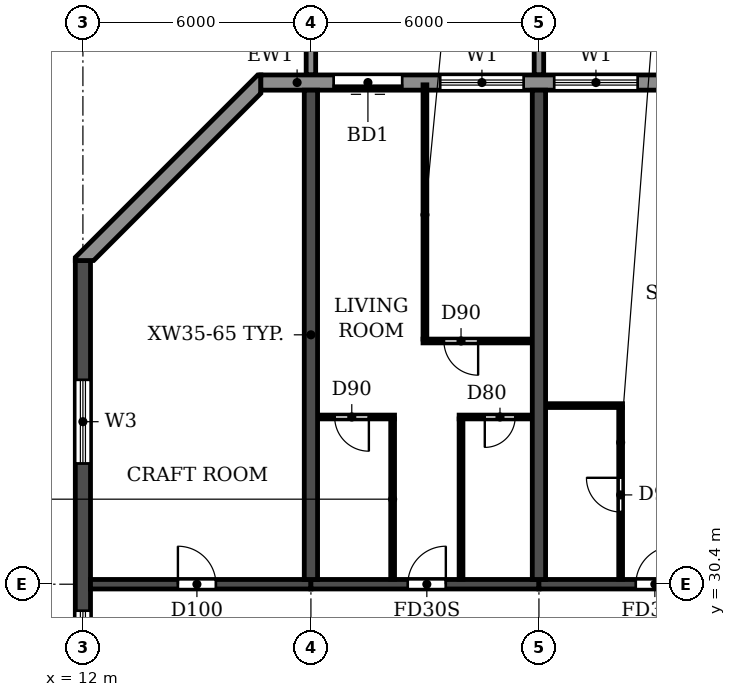
"""IFC4 building model, lengths in metres.
Left out: names, types, materials, properties, quantities, classifications, styles, units other than length and angle.
Written with IfcOpenShell. Run it as: python <this file> out.ifc"""

import sys

from ifc_helpers import new_model, si_unit, direction, frame, frame_2d, origin, place, context, subcontext, project, spatial, polyline, rectangle, outline, extrude, source, transform, mapped, element, fill, save


model = new_model("IFC4")
c1 = context("Model", 3, precision=1e-05, world=origin(), true_north=direction((0.0, 1.0)))
c2 = subcontext(c1, "Body", "Model", "MODEL_VIEW")
j1 = project(units=[si_unit("LENGTHUNIT", "METRE"), si_unit("PLANEANGLEUNIT", "RADIAN")], contexts=[c1])
p1 = place(None, origin())
s1 = spatial("IfcSite", under=j1, at=p1, CompositionType="ELEMENT")
p2 = place(p1, origin())
s2 = spatial("IfcBuilding", under=s1, at=p2, CompositionType="ELEMENT")
p3 = place(p2, frame((0.0, 0.0, 112.5)))
s3 = spatial("IfcBuildingStorey", under=s2, at=p3, CompositionType="ELEMENT", Elevation=112.5)
for number, where, z_axis, x_axis in (
    (1, (18.0, 30.525, 0.0), (0.0, 0.0, 1.0), (0.0, 1.0, 0.0)),
    (2, (24.0, 30.525, 0.0), (0.0, 0.0, 1.0), (0.0, 1.0, 0.0)),
):
    element("IfcWall", number, at=place(p3, frame(where, z_axis=z_axis, x_axis=x_axis)), inside=s3, PredefinedType="SHEAR", context=c2, shape_type="SweptSolid", body=[
        extrude(rectangle(XDim=12.875, YDim=0.35, at=frame_2d((6.438, 0.0))), origin(), (0.0, 0.0, 1.0), 2.95),
    ])
p4 = place(p3, frame((12.0, 4.683, 0.0), z_axis=(0.0, 0.0, 1.0), x_axis=(0.0, 1.0, 0.0)))
e3 = element("IfcWall", 3, at=p4, inside=s3, PredefinedType="SHEAR", context=c2, shape_type="SweptSolid", body=[
    extrude(rectangle(XDim=34.234, YDim=0.4, at=frame_2d((17.117, 0.0))), origin(), (0.0, 0.0, 1.0), 2.95),
])
p5 = place(p4, frame((23.817, 0.0, 0.9)))
e4 = element("IfcOpeningElement", 4, at=p5, cuts=e3, PredefinedType="OPENING", context=c2, shape_type="SweptSolid", body=[
    extrude(rectangle(XDim=1.2, YDim=1.5, at=frame_2d((0.6, 0.75))), frame((0.0, 0.21, 0.0), z_axis=(0.0, -1.0, 0.0), x_axis=(1.0, 0.0, 0.0)), (0.0, 0.0, 1.0), 0.42),
])
p6 = place(p4, frame((8.017, 0.0, 0.9)))
e5 = element("IfcOpeningElement", 5, at=p6, cuts=e3, PredefinedType="OPENING", context=c2, shape_type="SweptSolid", body=[
    extrude(rectangle(XDim=1.2, YDim=1.5, at=frame_2d((0.6, 0.75))), frame((0.0, 0.21, 0.0), z_axis=(0.0, -1.0, 0.0), x_axis=(1.0, 0.0, 0.0)), (0.0, 0.0, 1.0), 0.42),
])
p7 = place(p4, frame((15.917, 0.0, 0.9)))
e6 = element("IfcOpeningElement", 6, at=p7, cuts=e3, PredefinedType="OPENING", context=c2, shape_type="SweptSolid", body=[
    extrude(rectangle(XDim=1.2, YDim=1.5, at=frame_2d((0.6, 0.75))), frame((0.0, 0.21, 0.0), z_axis=(0.0, -1.0, 0.0), x_axis=(1.0, 0.0, 0.0)), (0.0, 0.0, 1.0), 0.42),
])
p8 = place(p4, frame((28.894, 0.0, 0.6)))
e7 = element("IfcOpeningElement", 7, at=p8, cuts=e3, PredefinedType="OPENING", context=c2, shape_type="SweptSolid", body=[
    extrude(rectangle(XDim=2.2, YDim=1.8, at=frame_2d((1.1, 0.9))), frame((0.0, 0.21, 0.0), z_axis=(0.0, -1.0, 0.0), x_axis=(1.0, 0.0, 0.0)), (0.0, 0.0, 1.0), 0.42),
])
p9 = place(p4, frame((2.541, 0.0, 0.6)))
e8 = element("IfcOpeningElement", 8, at=p9, cuts=e3, PredefinedType="OPENING", context=c2, shape_type="SweptSolid", body=[
    extrude(rectangle(XDim=2.2, YDim=1.8, at=frame_2d((1.1, 0.9))), frame((0.0, 0.21, 0.0), z_axis=(0.0, -1.0, 0.0), x_axis=(1.0, 0.0, 0.0)), (0.0, 0.0, 1.0), 0.42),
])
p10 = place(p3, frame((12.2, 30.4, 0.0), z_axis=(0.0, 0.0, 1.0), x_axis=(1.0, 0.0, 0.0)))
e9 = element("IfcWall", 9, at=p10, inside=s3, PredefinedType="SHEAR", context=c2, shape_type="SweptSolid", body=[
    extrude(rectangle(XDim=5.8, YDim=0.25, at=frame_2d((2.9, 0.0))), origin(), (0.0, 0.0, 1.0), 2.35),
])
p11 = place(p10, frame((2.3, 0.0, 0.0)))
e10 = element("IfcOpeningElement", 10, at=p11, cuts=e9, PredefinedType="OPENING", context=c2, shape_type="SweptSolid", body=[
    extrude(rectangle(XDim=1.0, YDim=2.1, at=frame_2d((0.5, 1.05))), frame((0.0, 0.135, 0.0), z_axis=(0.0, -1.0, 0.0), x_axis=(1.0, 0.0, 0.0)), (0.0, 0.0, 1.0), 0.27),
])
p12 = place(p3, frame((18.0, 30.4, 0.0), z_axis=(0.0, 0.0, 1.0), x_axis=(1.0, 0.0, 0.0)))
e11 = element("IfcWall", 11, at=p12, inside=s3, PredefinedType="SHEAR", context=c2, shape_type="SweptSolid", body=[
    extrude(rectangle(XDim=6.0, YDim=0.25, at=frame_2d((3.0, 0.0))), origin(), (0.0, 0.0, 1.0), 2.35),
])
p13 = place(p12, frame((2.55, 0.0, 0.0)))
e12 = element("IfcOpeningElement", 12, at=p13, cuts=e11, PredefinedType="OPENING", context=c2, shape_type="SweptSolid", body=[
    extrude(rectangle(XDim=1.0, YDim=2.1, at=frame_2d((0.5, 1.05))), frame((0.0, 0.135, 0.0), z_axis=(0.0, -1.0, 0.0), x_axis=(1.0, 0.0, 0.0)), (0.0, 0.0, 1.0), 0.27),
])
p14 = place(p3, frame((24.0, 30.4, 0.0), z_axis=(0.0, 0.0, 1.0), x_axis=(1.0, 0.0, 0.0)))
e13 = element("IfcWall", 13, at=p14, inside=s3, PredefinedType="SHEAR", context=c2, shape_type="SweptSolid", body=[
    extrude(rectangle(XDim=6.0, YDim=0.25, at=frame_2d((3.0, 0.0))), origin(), (0.0, 0.0, 1.0), 2.35),
])
p15 = place(p14, frame((2.55, 0.0, 0.0)))
e14 = element("IfcOpeningElement", 14, at=p15, cuts=e13, PredefinedType="OPENING", context=c2, shape_type="SweptSolid", body=[
    extrude(rectangle(XDim=1.0, YDim=2.1, at=frame_2d((0.5, 1.05))), frame((0.0, 0.135, 0.0), z_axis=(0.0, -1.0, 0.0), x_axis=(1.0, 0.0, 0.0)), (0.0, 0.0, 1.0), 0.27),
])
p16 = place(p3, frame((85.317, 43.6, 0.0), z_axis=(0.0, 0.0, 1.0), x_axis=(-1.0, 0.0, 0.0)))
e15 = element("IfcWall", 15, at=p16, inside=s3, PredefinedType="STANDARD", context=c2, shape_type="SweptSolid", body=[
    extrude(rectangle(XDim=68.634, YDim=0.4, at=frame_2d((34.317, 0.0))), origin(), (0.0, 0.0, 1.0), 2.95),
])
p17 = place(p16, frame((64.917, 0.0, 0.0)))
e16 = element("IfcOpeningElement", 16, at=p17, cuts=e15, PredefinedType="OPENING", context=c2, shape_type="SweptSolid", body=[
    extrude(rectangle(XDim=1.8, YDim=2.4, at=frame_2d((0.9, 1.2))), frame((0.0, 0.21, 0.0), z_axis=(0.0, -1.0, 0.0), x_axis=(1.0, 0.0, 0.0)), (0.0, 0.0, 1.0), 0.42),
])
p18 = place(p16, frame((61.717, 0.0, 0.9)))
e17 = element("IfcOpeningElement", 17, at=p18, cuts=e15, PredefinedType="OPENING", context=c2, shape_type="SweptSolid", body=[
    extrude(rectangle(XDim=2.2, YDim=1.5, at=frame_2d((1.1, 0.75))), frame((0.0, 0.21, 0.0), z_axis=(0.0, -1.0, 0.0), x_axis=(1.0, 0.0, 0.0)), (0.0, 0.0, 1.0), 0.42),
])
p19 = place(p16, frame((58.717, 0.0, 0.9)))
e18 = element("IfcOpeningElement", 18, at=p19, cuts=e15, PredefinedType="OPENING", context=c2, shape_type="SweptSolid", body=[
    extrude(rectangle(XDim=2.2, YDim=1.5, at=frame_2d((1.1, 0.75))), frame((0.0, 0.21, 0.0), z_axis=(0.0, -1.0, 0.0), x_axis=(1.0, 0.0, 0.0)), (0.0, 0.0, 1.0), 0.42),
])
p20 = place(p16, frame((55.917, 0.0, 0.0)))
e19 = element("IfcOpeningElement", 19, at=p20, cuts=e15, PredefinedType="OPENING", context=c2, shape_type="SweptSolid", body=[
    extrude(rectangle(XDim=1.8, YDim=2.4, at=frame_2d((0.9, 1.2))), frame((0.0, 0.21, 0.0), z_axis=(0.0, -1.0, 0.0), x_axis=(1.0, 0.0, 0.0)), (0.0, 0.0, 1.0), 0.42),
])
p21 = place(p16, frame((52.917, 0.0, 0.0)))
e20 = element("IfcOpeningElement", 20, at=p21, cuts=e15, PredefinedType="OPENING", context=c2, shape_type="SweptSolid", body=[
    extrude(rectangle(XDim=1.8, YDim=2.4, at=frame_2d((0.9, 1.2))), frame((0.0, 0.21, 0.0), z_axis=(0.0, -1.0, 0.0), x_axis=(1.0, 0.0, 0.0)), (0.0, 0.0, 1.0), 0.42),
])
p22 = place(p16, frame((49.717, 0.0, 0.9)))
e21 = element("IfcOpeningElement", 21, at=p22, cuts=e15, PredefinedType="OPENING", context=c2, shape_type="SweptSolid", body=[
    extrude(rectangle(XDim=2.2, YDim=1.5, at=frame_2d((1.1, 0.75))), frame((0.0, 0.21, 0.0), z_axis=(0.0, -1.0, 0.0), x_axis=(1.0, 0.0, 0.0)), (0.0, 0.0, 1.0), 0.42),
])
p23 = place(p16, frame((46.717, 0.0, 0.9)))
e22 = element("IfcOpeningElement", 22, at=p23, cuts=e15, PredefinedType="OPENING", context=c2, shape_type="SweptSolid", body=[
    extrude(rectangle(XDim=2.2, YDim=1.5, at=frame_2d((1.1, 0.75))), frame((0.0, 0.21, 0.0), z_axis=(0.0, -1.0, 0.0), x_axis=(1.0, 0.0, 0.0)), (0.0, 0.0, 1.0), 0.42),
])
p24 = place(p16, frame((43.917, 0.0, 0.0)))
e23 = element("IfcOpeningElement", 23, at=p24, cuts=e15, PredefinedType="OPENING", context=c2, shape_type="SweptSolid", body=[
    extrude(rectangle(XDim=1.8, YDim=2.4, at=frame_2d((0.9, 1.2))), frame((0.0, 0.21, 0.0), z_axis=(0.0, -1.0, 0.0), x_axis=(1.0, 0.0, 0.0)), (0.0, 0.0, 1.0), 0.42),
])
p25 = place(p16, frame((40.717, 0.0, 0.9)))
e24 = element("IfcOpeningElement", 24, at=p25, cuts=e15, PredefinedType="OPENING", context=c2, shape_type="SweptSolid", body=[
    extrude(rectangle(XDim=2.2, YDim=1.5, at=frame_2d((1.1, 0.75))), frame((0.0, 0.21, 0.0), z_axis=(0.0, -1.0, 0.0), x_axis=(1.0, 0.0, 0.0)), (0.0, 0.0, 1.0), 0.42),
])
p26 = place(p16, frame((37.717, 0.0, 0.9)))
e25 = element("IfcOpeningElement", 25, at=p26, cuts=e15, PredefinedType="OPENING", context=c2, shape_type="SweptSolid", body=[
    extrude(rectangle(XDim=2.2, YDim=1.5, at=frame_2d((1.1, 0.75))), frame((0.0, 0.21, 0.0), z_axis=(0.0, -1.0, 0.0), x_axis=(1.0, 0.0, 0.0)), (0.0, 0.0, 1.0), 0.42),
])
p27 = place(p16, frame((34.917, 0.0, 0.0)))
e26 = element("IfcOpeningElement", 26, at=p27, cuts=e15, PredefinedType="OPENING", context=c2, shape_type="SweptSolid", body=[
    extrude(rectangle(XDim=1.8, YDim=2.4, at=frame_2d((0.9, 1.2))), frame((0.0, 0.21, 0.0), z_axis=(0.0, -1.0, 0.0), x_axis=(1.0, 0.0, 0.0)), (0.0, 0.0, 1.0), 0.42),
])
p28 = place(p16, frame((31.717, 0.0, 0.9)))
e27 = element("IfcOpeningElement", 27, at=p28, cuts=e15, PredefinedType="OPENING", context=c2, shape_type="SweptSolid", body=[
    extrude(rectangle(XDim=2.2, YDim=1.5, at=frame_2d((1.1, 0.75))), frame((0.0, 0.21, 0.0), z_axis=(0.0, -1.0, 0.0), x_axis=(1.0, 0.0, 0.0)), (0.0, 0.0, 1.0), 0.42),
])
p29 = place(p16, frame((28.917, 0.0, 0.0)))
e28 = element("IfcOpeningElement", 28, at=p29, cuts=e15, PredefinedType="OPENING", context=c2, shape_type="SweptSolid", body=[
    extrude(rectangle(XDim=1.8, YDim=2.4, at=frame_2d((0.9, 1.2))), frame((0.0, 0.21, 0.0), z_axis=(0.0, -1.0, 0.0), x_axis=(1.0, 0.0, 0.0)), (0.0, 0.0, 1.0), 0.42),
])
p30 = place(p16, frame((25.717, 0.0, 0.9)))
e29 = element("IfcOpeningElement", 29, at=p30, cuts=e15, PredefinedType="OPENING", context=c2, shape_type="SweptSolid", body=[
    extrude(rectangle(XDim=2.2, YDim=1.5, at=frame_2d((1.1, 0.75))), frame((0.0, 0.21, 0.0), z_axis=(0.0, -1.0, 0.0), x_axis=(1.0, 0.0, 0.0)), (0.0, 0.0, 1.0), 0.42),
])
p31 = place(p16, frame((22.717, 0.0, 0.9)))
e30 = element("IfcOpeningElement", 30, at=p31, cuts=e15, PredefinedType="OPENING", context=c2, shape_type="SweptSolid", body=[
    extrude(rectangle(XDim=2.2, YDim=1.5, at=frame_2d((1.1, 0.75))), frame((0.0, 0.21, 0.0), z_axis=(0.0, -1.0, 0.0), x_axis=(1.0, 0.0, 0.0)), (0.0, 0.0, 1.0), 0.42),
])
p32 = place(p16, frame((19.917, 0.0, 0.0)))
e31 = element("IfcOpeningElement", 31, at=p32, cuts=e15, PredefinedType="OPENING", context=c2, shape_type="SweptSolid", body=[
    extrude(rectangle(XDim=1.8, YDim=2.4, at=frame_2d((0.9, 1.2))), frame((0.0, 0.21, 0.0), z_axis=(0.0, -1.0, 0.0), x_axis=(1.0, 0.0, 0.0)), (0.0, 0.0, 1.0), 0.42),
])
p33 = place(p16, frame((16.717, 0.0, 0.9)))
e32 = element("IfcOpeningElement", 32, at=p33, cuts=e15, PredefinedType="OPENING", context=c2, shape_type="SweptSolid", body=[
    extrude(rectangle(XDim=2.2, YDim=1.5, at=frame_2d((1.1, 0.75))), frame((0.0, 0.21, 0.0), z_axis=(0.0, -1.0, 0.0), x_axis=(1.0, 0.0, 0.0)), (0.0, 0.0, 1.0), 0.42),
])
p34 = place(p16, frame((13.917, 0.0, 0.0)))
e33 = element("IfcOpeningElement", 33, at=p34, cuts=e15, PredefinedType="OPENING", context=c2, shape_type="SweptSolid", body=[
    extrude(rectangle(XDim=1.8, YDim=2.4, at=frame_2d((0.9, 1.2))), frame((0.0, 0.21, 0.0), z_axis=(0.0, -1.0, 0.0), x_axis=(1.0, 0.0, 0.0)), (0.0, 0.0, 1.0), 0.42),
])
p35 = place(p16, frame((10.717, 0.0, 0.9)))
e34 = element("IfcOpeningElement", 34, at=p35, cuts=e15, PredefinedType="OPENING", context=c2, shape_type="SweptSolid", body=[
    extrude(rectangle(XDim=2.2, YDim=1.5, at=frame_2d((1.1, 0.75))), frame((0.0, 0.21, 0.0), z_axis=(0.0, -1.0, 0.0), x_axis=(1.0, 0.0, 0.0)), (0.0, 0.0, 1.0), 0.42),
])
p36 = place(p16, frame((7.717, 0.0, 0.9)))
e35 = element("IfcOpeningElement", 35, at=p36, cuts=e15, PredefinedType="OPENING", context=c2, shape_type="SweptSolid", body=[
    extrude(rectangle(XDim=2.2, YDim=1.5, at=frame_2d((1.1, 0.75))), frame((0.0, 0.21, 0.0), z_axis=(0.0, -1.0, 0.0), x_axis=(1.0, 0.0, 0.0)), (0.0, 0.0, 1.0), 0.42),
])
p37 = place(p16, frame((4.917, 0.0, 0.0)))
e36 = element("IfcOpeningElement", 36, at=p37, cuts=e15, PredefinedType="OPENING", context=c2, shape_type="SweptSolid", body=[
    extrude(rectangle(XDim=1.8, YDim=2.4, at=frame_2d((0.9, 1.2))), frame((0.0, 0.21, 0.0), z_axis=(0.0, -1.0, 0.0), x_axis=(1.0, 0.0, 0.0)), (0.0, 0.0, 1.0), 0.42),
])
p38 = place(p16, frame((1.717, 0.0, 0.9)))
e37 = element("IfcOpeningElement", 37, at=p38, cuts=e15, PredefinedType="OPENING", context=c2, shape_type="SweptSolid", body=[
    extrude(rectangle(XDim=2.2, YDim=1.5, at=frame_2d((1.1, 0.75))), frame((0.0, 0.21, 0.0), z_axis=(0.0, -1.0, 0.0), x_axis=(1.0, 0.0, 0.0)), (0.0, 0.0, 1.0), 0.42),
])
p39 = place(p3, origin())
e38 = element("IfcWall", 38, at=p39, inside=s3, PredefinedType="STANDARD", context=c2, shape_type="SweptSolid", body=[
    extrude(outline(polyline([(16.683, 43.8), (16.6, 43.8), (11.8, 39.0), (11.8, 38.917), (12.283, 38.917), (16.683, 43.317), (16.683, 43.8)])), origin(), (0.0, 0.0, 1.0), 2.95),
])
m1 = source(origin(), c2, "Body", "SweptSolid", [
    extrude(outline(polyline([(0.0, 0.0), (0.25, 0.0), (0.25, 3.1), (0.0, 3.1), (0.0, 0.0)])), origin(), (0.0, 0.0, 1.0), 3.1),
])
for number, where in (
    (39, (17.875, 43.8, 0.0)),
    (40, (23.875, 43.8, 0.0)),
):
    element("IfcWall", number, at=place(p3, frame(where)), inside=s3, PredefinedType="STANDARD", context=c2, shape_type="MappedRepresentation", body=[
        mapped(m1, transform((0.0, 0.0, 0.0))),
    ])
p40 = place(p3, frame((18.185, 34.8, 0.0), z_axis=(0.0, 0.0, 1.0), x_axis=(1.0, 0.0, 0.0)))
e41 = element("IfcWall", 41, at=p40, inside=s3, PredefinedType="PARTITIONING", context=c2, shape_type="SweptSolid", body=[
    extrude(rectangle(XDim=2.015, YDim=0.1, at=frame_2d((1.007, 0.0))), origin(), (0.0, 0.0, 1.0), 2.95),
])
p41 = place(p40, frame((0.44, 0.0, 0.0)))
e42 = element("IfcOpeningElement", 42, at=p41, cuts=e41, PredefinedType="OPENING", context=c2, shape_type="SweptSolid", body=[
    extrude(rectangle(XDim=0.9, YDim=2.1, at=frame_2d((0.45, 1.05))), frame((0.0, 0.06, 0.0), z_axis=(0.0, -1.0, 0.0), x_axis=(1.0, 0.0, 0.0)), (0.0, 0.0, 1.0), 0.12),
])
p42 = place(p3, frame((21.9, 34.8, 0.0), z_axis=(0.0, 0.0, 1.0), x_axis=(1.0, 0.0, 0.0)))
e43 = element("IfcWall", 43, at=p42, inside=s3, PredefinedType="PARTITIONING", context=c2, shape_type="SweptSolid", body=[
    extrude(rectangle(XDim=1.915, YDim=0.1, at=frame_2d((0.958, 0.0))), origin(), (0.0, 0.0, 1.0), 2.95),
])
p43 = place(p42, frame((0.675, 0.0, 0.0)))
e44 = element("IfcOpeningElement", 44, at=p43, cuts=e43, PredefinedType="OPENING", context=c2, shape_type="SweptSolid", body=[
    extrude(rectangle(XDim=0.8, YDim=2.1, at=frame_2d((0.4, 1.05))), frame((0.0, 0.06, 0.0), z_axis=(0.0, -1.0, 0.0), x_axis=(1.0, 0.0, 0.0)), (0.0, 0.0, 1.0), 0.12),
])
p44 = place(p3, frame((24.185, 35.1, 0.0), z_axis=(0.0, 0.0, 1.0), x_axis=(1.0, 0.0, 0.0)))
e45 = element("IfcWall", 45, at=p44, inside=s3, PredefinedType="PARTITIONING", context=c2, shape_type="SweptSolid", body=[
    extrude(rectangle(XDim=2.015, YDim=0.1, at=frame_2d((1.007, 0.0))), origin(), (0.0, 0.0, 1.0), 2.95),
])
p45 = place(p3, frame((20.95, 36.8, 0.0), z_axis=(0.0, 0.0, 1.0), x_axis=(1.0, 0.0, 0.0)))
e46 = element("IfcWall", 46, at=p45, inside=s3, PredefinedType="PARTITIONING", context=c2, shape_type="SweptSolid", body=[
    extrude(rectangle(XDim=2.865, YDim=0.1, at=frame_2d((1.433, 0.0))), origin(), (0.0, 0.0, 1.0), 2.95),
])
p46 = place(p45, frame((0.55, 0.0, 0.0)))
e47 = element("IfcOpeningElement", 47, at=p46, cuts=e46, PredefinedType="OPENING", context=c2, shape_type="SweptSolid", body=[
    extrude(rectangle(XDim=0.9, YDim=2.1, at=frame_2d((0.45, 1.05))), frame((0.0, 0.06, 0.0), z_axis=(0.0, -1.0, 0.0), x_axis=(1.0, 0.0, 0.0)), (0.0, 0.0, 1.0), 0.12),
])
p47 = place(p3, frame((20.15, 30.535, 0.0), z_axis=(0.0, 0.0, 1.0), x_axis=(0.0, 1.0, 0.0)))
e48 = element("IfcWall", 48, at=p47, inside=s3, PredefinedType="PARTITIONING", context=c2, shape_type="SweptSolid", body=[
    extrude(rectangle(XDim=4.215, YDim=0.1, at=frame_2d((2.107, 0.0))), origin(), (0.0, 0.0, 1.0), 2.95),
])
p48 = place(p3, frame((21.0, 36.85, 0.0), z_axis=(0.0, 0.0, 1.0), x_axis=(0.0, 1.0, 0.0)))
e49 = element("IfcWall", 49, at=p48, inside=s3, PredefinedType="PARTITIONING", context=c2, shape_type="SweptSolid", body=[
    extrude(rectangle(XDim=6.69, YDim=0.1, at=frame_2d((3.345, 0.0))), origin(), (0.0, 0.0, 1.0), 2.95),
])
p49 = place(p3, frame((21.95, 30.535, 0.0), z_axis=(0.0, 0.0, 1.0), x_axis=(0.0, 1.0, 0.0)))
e50 = element("IfcWall", 50, at=p49, inside=s3, PredefinedType="PARTITIONING", context=c2, shape_type="SweptSolid", body=[
    extrude(rectangle(XDim=4.215, YDim=0.1, at=frame_2d((2.107, 0.0))), origin(), (0.0, 0.0, 1.0), 2.95),
])
p50 = place(p3, frame((26.15, 30.535, 0.0), z_axis=(0.0, 0.0, 1.0), x_axis=(0.0, 1.0, 0.0)))
e51 = element("IfcWall", 51, at=p50, inside=s3, PredefinedType="PARTITIONING", context=c2, shape_type="SweptSolid", body=[
    extrude(rectangle(XDim=4.515, YDim=0.1, at=frame_2d((2.258, 0.0))), origin(), (0.0, 0.0, 1.0), 2.95),
])
p51 = place(p50, frame((1.765, 0.0, 0.0)))
e52 = element("IfcOpeningElement", 52, at=p51, cuts=e51, PredefinedType="OPENING", context=c2, shape_type="SweptSolid", body=[
    extrude(rectangle(XDim=0.9, YDim=2.1, at=frame_2d((0.45, 1.05))), frame((0.0, 0.06, 0.0), z_axis=(0.0, -1.0, 0.0), x_axis=(1.0, 0.0, 0.0)), (0.0, 0.0, 1.0), 0.12),
])
p52 = place(p17, origin())
e53 = element("IfcDoor", 53, at=p52, inside=s3, OperationType="DOUBLE_DOOR_SLIDING", PredefinedType="DOOR", context=c2, shape_type="SweptSolid", body=[
    extrude(rectangle(XDim=1.8, YDim=2.4, at=frame_2d((0.9, 1.2))), frame((0.0, 0.025, 0.0), z_axis=(0.0, -1.0, 0.0), x_axis=(1.0, 0.0, 0.0)), (0.0, 0.0, 1.0), 0.05),
])
fill(e16, e53)
p53 = place(p18, origin())
e54 = element("IfcWindow", 54, at=p53, inside=s3, PartitioningType="DOUBLE_PANEL_HORIZONTAL", PredefinedType="WINDOW", context=c2, shape_type="SweptSolid", body=[
    extrude(rectangle(XDim=2.2, YDim=1.5, at=frame_2d((1.1, 0.75))), frame((0.0, 0.03, 0.0), z_axis=(0.0, -1.0, 0.0), x_axis=(1.0, 0.0, 0.0)), (0.0, 0.0, 1.0), 0.06),
])
fill(e17, e54)
p54 = place(p19, origin())
e55 = element("IfcWindow", 55, at=p54, inside=s3, PartitioningType="DOUBLE_PANEL_HORIZONTAL", PredefinedType="WINDOW", context=c2, shape_type="SweptSolid", body=[
    extrude(rectangle(XDim=2.2, YDim=1.5, at=frame_2d((1.1, 0.75))), frame((0.0, 0.03, 0.0), z_axis=(0.0, -1.0, 0.0), x_axis=(1.0, 0.0, 0.0)), (0.0, 0.0, 1.0), 0.06),
])
fill(e18, e55)
p55 = place(p5, origin())
e56 = element("IfcWindow", 56, at=p55, inside=s3, PartitioningType="SINGLE_PANEL", PredefinedType="WINDOW", context=c2, shape_type="SweptSolid", body=[
    extrude(rectangle(XDim=1.2, YDim=1.5, at=frame_2d((0.6, 0.75))), frame((0.0, 0.03, 0.0), z_axis=(0.0, -1.0, 0.0), x_axis=(1.0, 0.0, 0.0)), (0.0, 0.0, 1.0), 0.06),
])
fill(e4, e56)
p56 = place(p8, origin())
e57 = element("IfcWindow", 57, at=p56, inside=s3, PartitioningType="DOUBLE_PANEL_HORIZONTAL", PredefinedType="WINDOW", context=c2, shape_type="SweptSolid", body=[
    extrude(rectangle(XDim=2.2, YDim=1.8, at=frame_2d((1.1, 0.9))), frame((0.0, 0.03, 0.0), z_axis=(0.0, -1.0, 0.0), x_axis=(1.0, 0.0, 0.0)), (0.0, 0.0, 1.0), 0.06),
])
fill(e7, e57)
p57 = place(p11, origin())
e58 = element("IfcDoor", 58, at=p57, inside=s3, OperationType="SINGLE_SWING_LEFT", PredefinedType="DOOR", context=c2, shape_type="SweptSolid", body=[
    extrude(rectangle(XDim=1.0, YDim=2.1, at=frame_2d((0.5, 1.05))), frame((0.0, 0.025, 0.0), z_axis=(0.0, -1.0, 0.0), x_axis=(1.0, 0.0, 0.0)), (0.0, 0.0, 1.0), 0.05),
])
fill(e10, e58)
p58 = place(p41, frame((0.9, 0.0, 0.0), z_axis=(0.0, 0.0, 1.0), x_axis=(-1.0, 0.0, 0.0)))
e59 = element("IfcDoor", 59, at=p58, inside=s3, OperationType="SINGLE_SWING_LEFT", PredefinedType="DOOR", context=c2, shape_type="SweptSolid", body=[
    extrude(rectangle(XDim=0.9, YDim=2.1, at=frame_2d((0.45, 1.05))), frame((0.0, 0.025, 0.0), z_axis=(0.0, -1.0, 0.0), x_axis=(1.0, 0.0, 0.0)), (0.0, 0.0, 1.0), 0.05),
])
fill(e42, e59)
p59 = place(p13, origin())
e60 = element("IfcDoor", 60, at=p59, inside=s3, OperationType="SINGLE_SWING_RIGHT", PredefinedType="DOOR", context=c2, shape_type="SweptSolid", body=[
    extrude(rectangle(XDim=1.0, YDim=2.1, at=frame_2d((0.5, 1.05))), frame((0.0, 0.025, 0.0), z_axis=(0.0, -1.0, 0.0), x_axis=(1.0, 0.0, 0.0)), (0.0, 0.0, 1.0), 0.05),
])
fill(e12, e60)
p60 = place(p46, frame((0.9, 0.0, 0.0), z_axis=(0.0, 0.0, 1.0), x_axis=(-1.0, 0.0, 0.0)))
e61 = element("IfcDoor", 61, at=p60, inside=s3, OperationType="SINGLE_SWING_LEFT", PredefinedType="DOOR", context=c2, shape_type="SweptSolid", body=[
    extrude(rectangle(XDim=0.9, YDim=2.1, at=frame_2d((0.45, 1.05))), frame((0.0, 0.025, 0.0), z_axis=(0.0, -1.0, 0.0), x_axis=(1.0, 0.0, 0.0)), (0.0, 0.0, 1.0), 0.05),
])
fill(e47, e61)
p61 = place(p43, frame((0.8, 0.0, 0.0), z_axis=(0.0, 0.0, 1.0), x_axis=(-1.0, 0.0, 0.0)))
e62 = element("IfcDoor", 62, at=p61, inside=s3, OperationType="SINGLE_SWING_RIGHT", PredefinedType="DOOR", context=c2, shape_type="SweptSolid", body=[
    extrude(rectangle(XDim=0.8, YDim=2.1, at=frame_2d((0.4, 1.05))), frame((0.0, 0.025, 0.0), z_axis=(0.0, -1.0, 0.0), x_axis=(1.0, 0.0, 0.0)), (0.0, 0.0, 1.0), 0.05),
])
fill(e44, e62)
p62 = place(p51, origin())
e63 = element("IfcDoor", 63, at=p62, inside=s3, OperationType="SINGLE_SWING_RIGHT", PredefinedType="DOOR", context=c2, shape_type="SweptSolid", body=[
    extrude(rectangle(XDim=0.9, YDim=2.1, at=frame_2d((0.45, 1.05))), frame((0.0, 0.025, 0.0), z_axis=(0.0, -1.0, 0.0), x_axis=(1.0, 0.0, 0.0)), (0.0, 0.0, 1.0), 0.05),
])
fill(e52, e63)
p63 = place(p15, origin())
e64 = element("IfcDoor", 64, at=p63, inside=s3, OperationType="SINGLE_SWING_RIGHT", PredefinedType="DOOR", context=c2, shape_type="SweptSolid", body=[
    extrude(rectangle(XDim=1.0, YDim=2.1, at=frame_2d((0.5, 1.05))), frame((0.0, 0.025, 0.0), z_axis=(0.0, -1.0, 0.0), x_axis=(1.0, 0.0, 0.0)), (0.0, 0.0, 1.0), 0.05),
])
fill(e14, e64)
save(model, sys.argv[1])
